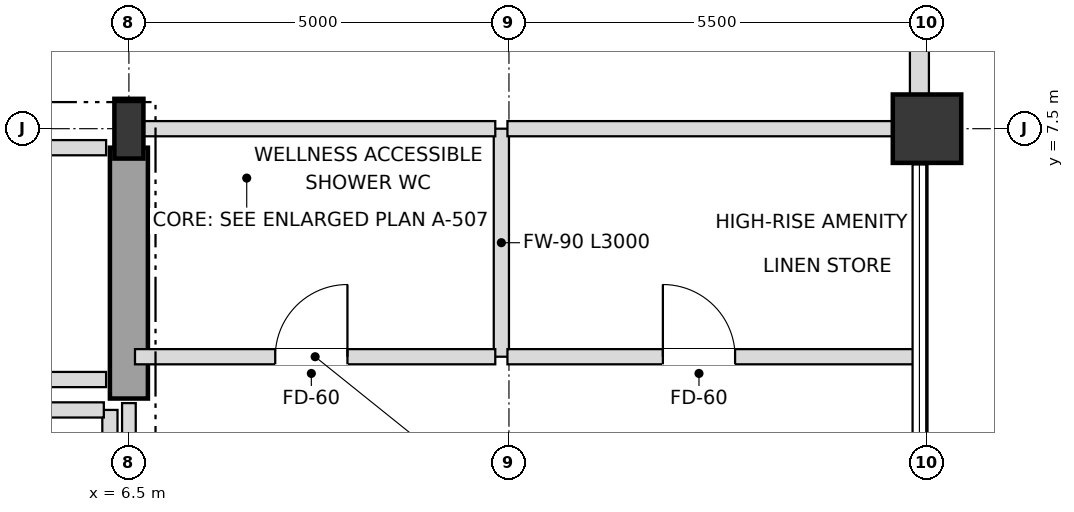
"""IFC4 building model, lengths in metres.
Left out: names, types, materials, properties, quantities, classifications, styles, units other than length and angle.
Written with IfcOpenShell. Run it as: python <this file> out.ifc"""

import sys

from ifc_helpers import new_model, si_unit, direction, frame, frame_2d, origin, origin_2d, place, context, subcontext, project, spatial, rectangle, i_section, extrude, element, fill, save


model = new_model("IFC4")
c1 = context("Model", 3, precision=1e-05, world=origin(), true_north=direction((0.0, 1.0)))
c2 = subcontext(c1, "Body", "Model", "MODEL_VIEW")
j1 = project(units=[si_unit("LENGTHUNIT", "METRE"), si_unit("PLANEANGLEUNIT", "RADIAN")], contexts=[c1])
p1 = place(None, origin())
s1 = spatial("IfcSite", under=j1, at=p1, CompositionType="ELEMENT")
p2 = place(p1, origin())
s2 = spatial("IfcBuilding", under=s1, at=p2, CompositionType="ELEMENT")
p3 = place(p2, frame((0.0, 0.0, 258.3)))
s3 = spatial("IfcBuildingStorey", under=s2, at=p3, CompositionType="ELEMENT", Elevation=258.3)
p4 = place(p3, frame((6.5, 7.5, 0.0), z_axis=(0.0, 0.0, 1.0), x_axis=(1.0, 0.0, 0.0)))
e1 = element("IfcColumn", 1, at=p4, inside=s3, PredefinedType="COLUMN", context=c2, shape_type="SweptSolid", body=[
    extrude(i_section(OverallWidth=0.382, OverallDepth=0.786, WebThickness=0.02, FlangeThickness=0.033, at=origin_2d()), origin(), (0.0, 0.0, 1.0), 3.6),
])
p5 = place(p3, frame((17.0, 7.5, 0.0), z_axis=(0.0, 0.0, 1.0), x_axis=(1.0, 0.0, 0.0)))
e2 = element("IfcColumn", 2, at=p5, inside=s3, PredefinedType="USERDEFINED", context=c2, shape_type="SweptSolid", body=[
    extrude(rectangle(XDim=0.9, YDim=0.9, at=origin_2d()), origin(), (0.0, 0.0, 1.0), 3.6),
])
p6 = place(p3, frame((16.9, 7.945, 0.0), z_axis=(0.0, 0.0, 1.0), x_axis=(0.0, 1.0, 0.0)))
e3 = element("IfcWall", 3, at=p6, inside=s3, PredefinedType="SOLIDWALL", context=c2, shape_type="SweptSolid", body=[
    extrude(rectangle(XDim=4.61, YDim=0.25, at=frame_2d((2.305, 0.0))), origin(), (0.0, 0.0, 1.0), 2.748),
])
p7 = place(p6, frame((1.405, 0.0, 0.72)))
e4 = element("IfcOpeningElement", 4, at=p7, cuts=e3, PredefinedType="OPENING", context=c2, shape_type="SweptSolid", body=[
    extrude(rectangle(XDim=1.8, YDim=1.68, at=frame_2d((0.9, 0.84))), frame((0.0, 0.135, 0.0), z_axis=(0.0, -1.0, 0.0), x_axis=(1.0, 0.0, 0.0)), (0.0, 0.0, 1.0), 0.27),
])
p8 = place(p3, frame((6.5, 3.95, 0.0), z_axis=(0.0, 0.0, 1.0), x_axis=(0.0, 1.0, 0.0)))
e5 = element("IfcWall", 5, at=p8, inside=s3, PredefinedType="SHEAR", context=c2, shape_type="SweptSolid", body=[
    extrude(rectangle(XDim=3.3, YDim=0.5, at=frame_2d((1.65, 0.0))), origin(), (0.0, 0.0, 1.0), 3.38),
])
p9 = place(p3, frame((6.25, -1.35, 0.0), z_axis=(0.0, 0.0, 1.0), x_axis=(0.0, 1.0, 0.0)))
e6 = element("IfcWall", 6, at=p9, inside=s3, PredefinedType="SOLIDWALL", context=c2, shape_type="SweptSolid", body=[
    extrude(rectangle(XDim=5.15, YDim=0.2, at=frame_2d((2.575, 0.0))), origin(), (0.0, 0.0, 1.0), 3.38),
])
p10 = place(p3, frame((6.5, -1.44, 0.0), z_axis=(0.0, 0.0, 1.0), x_axis=(0.0, 1.0, 0.0)))
e7 = element("IfcWall", 7, at=p10, inside=s3, PredefinedType="PARTITIONING", context=c2, shape_type="SweptSolid", body=[
    extrude(rectangle(XDim=5.33, YDim=0.18, at=frame_2d((2.665, 0.0))), origin(), (0.0, 0.0, 1.0), 2.826),
])
p11 = place(p3, frame((11.4, 4.5, 0.0), z_axis=(0.0, 0.0, 1.0), x_axis=(0.0, 1.0, 0.0)))
e8 = element("IfcWall", 8, at=p11, inside=s3, PredefinedType="SOLIDWALL", context=c2, shape_type="SweptSolid", body=[
    extrude(rectangle(XDim=3.0, YDim=0.2, at=frame_2d((1.5, 0.0))), origin(), (0.0, 0.0, 1.0), 3.018),
])
p12 = place(p3, frame((4.13, 3.8, 0.0), z_axis=(0.0, 0.0, 1.0), x_axis=(1.0, 0.0, 0.0)))
e9 = element("IfcWall", 9, at=p12, inside=s3, PredefinedType="SOLIDWALL", context=c2, shape_type="SweptSolid", body=[
    extrude(rectangle(XDim=2.04, YDim=0.2, at=frame_2d((1.02, 0.0))), origin(), (0.0, 0.0, 1.0), 3.38),
])
p13 = place(p3, frame((4.13, 4.2, 0.0), z_axis=(0.0, 0.0, 1.0), x_axis=(1.0, 0.0, 0.0)))
e10 = element("IfcWall", 10, at=p13, inside=s3, PredefinedType="SOLIDWALL", context=c2, shape_type="SweptSolid", body=[
    extrude(rectangle(XDim=2.07, YDim=0.2, at=frame_2d((1.035, 0.0))), origin(), (0.0, 0.0, 1.0), 3.38),
])
p14 = place(p3, frame((6.58, 4.5, 0.0), z_axis=(0.0, 0.0, 1.0), x_axis=(1.0, 0.0, 0.0)))
e11 = element("IfcWall", 11, at=p14, inside=s3, PredefinedType="SOLIDWALL", context=c2, shape_type="SweptSolid", body=[
    extrude(rectangle(XDim=4.74, YDim=0.2, at=frame_2d((2.37, 0.0))), origin(), (0.0, 0.0, 1.0), 3.38),
])
p15 = place(p14, frame((1.845, 0.0, 0.0)))
e12 = element("IfcOpeningElement", 12, at=p15, cuts=e11, PredefinedType="OPENING", context=c2, shape_type="SweptSolid", body=[
    extrude(rectangle(XDim=0.95, YDim=2.15, at=frame_2d((0.475, 1.075))), frame((0.0, 0.11, 0.0), z_axis=(0.0, -1.0, 0.0), x_axis=(1.0, 0.0, 0.0)), (0.0, 0.0, 1.0), 0.22),
])
p16 = place(p3, frame((11.48, 4.5, 0.0), z_axis=(0.0, 0.0, 1.0), x_axis=(1.0, 0.0, 0.0)))
e13 = element("IfcWall", 13, at=p16, inside=s3, PredefinedType="SOLIDWALL", context=c2, shape_type="SweptSolid", body=[
    extrude(rectangle(XDim=5.34, YDim=0.2, at=frame_2d((2.67, 0.0))), origin(), (0.0, 0.0, 1.0), 3.38),
])
p17 = place(p16, frame((2.045, 0.0, 0.0)))
e14 = element("IfcOpeningElement", 14, at=p17, cuts=e13, PredefinedType="OPENING", context=c2, shape_type="SweptSolid", body=[
    extrude(rectangle(XDim=0.95, YDim=2.15, at=frame_2d((0.475, 1.075))), frame((0.0, 0.11, 0.0), z_axis=(0.0, -1.0, 0.0), x_axis=(1.0, 0.0, 0.0)), (0.0, 0.0, 1.0), 0.22),
])
p18 = place(p3, frame((4.13, 7.25, 0.0), z_axis=(0.0, 0.0, 1.0), x_axis=(1.0, 0.0, 0.0)))
e15 = element("IfcWall", 15, at=p18, inside=s3, PredefinedType="SOLIDWALL", context=c2, shape_type="SweptSolid", body=[
    extrude(rectangle(XDim=2.07, YDim=0.2, at=frame_2d((1.035, 0.0))), origin(), (0.0, 0.0, 1.0), 3.38),
])
p19 = place(p3, frame((6.5, 7.5, 0.0), z_axis=(0.0, 0.0, 1.0), x_axis=(1.0, 0.0, 0.0)))
e16 = element("IfcWall", 16, at=p19, inside=s3, PredefinedType="SOLIDWALL", context=c2, shape_type="SweptSolid", body=[
    extrude(rectangle(XDim=4.82, YDim=0.2, at=frame_2d((2.41, 0.0))), origin(), (0.0, 0.0, 1.0), 2.826),
])
p20 = place(p3, frame((11.48, 7.5, 0.0), z_axis=(0.0, 0.0, 1.0), x_axis=(1.0, 0.0, 0.0)))
e17 = element("IfcWall", 17, at=p20, inside=s3, PredefinedType="SOLIDWALL", context=c2, shape_type="SweptSolid", body=[
    extrude(rectangle(XDim=5.42, YDim=0.2, at=frame_2d((2.71, 0.0))), origin(), (0.0, 0.0, 1.0), 2.826),
])
p21 = place(p15, origin())
e18 = element("IfcDoor", 18, at=p21, inside=s3, OperationType="SINGLE_SWING_RIGHT", PredefinedType="DOOR", context=c2, shape_type="SweptSolid", body=[
    extrude(rectangle(XDim=0.95, YDim=2.15, at=frame_2d((0.475, 1.075))), frame((0.0, 0.025, 0.0), z_axis=(0.0, -1.0, 0.0), x_axis=(1.0, 0.0, 0.0)), (0.0, 0.0, 1.0), 0.05),
])
fill(e12, e18)
p22 = place(p17, origin())
e19 = element("IfcDoor", 19, at=p22, inside=s3, OperationType="SINGLE_SWING_LEFT", PredefinedType="DOOR", context=c2, shape_type="SweptSolid", body=[
    extrude(rectangle(XDim=0.95, YDim=2.15, at=frame_2d((0.475, 1.075))), frame((0.0, 0.025, 0.0), z_axis=(0.0, -1.0, 0.0), x_axis=(1.0, 0.0, 0.0)), (0.0, 0.0, 1.0), 0.05),
])
fill(e14, e19)
save(model, sys.argv[1])
